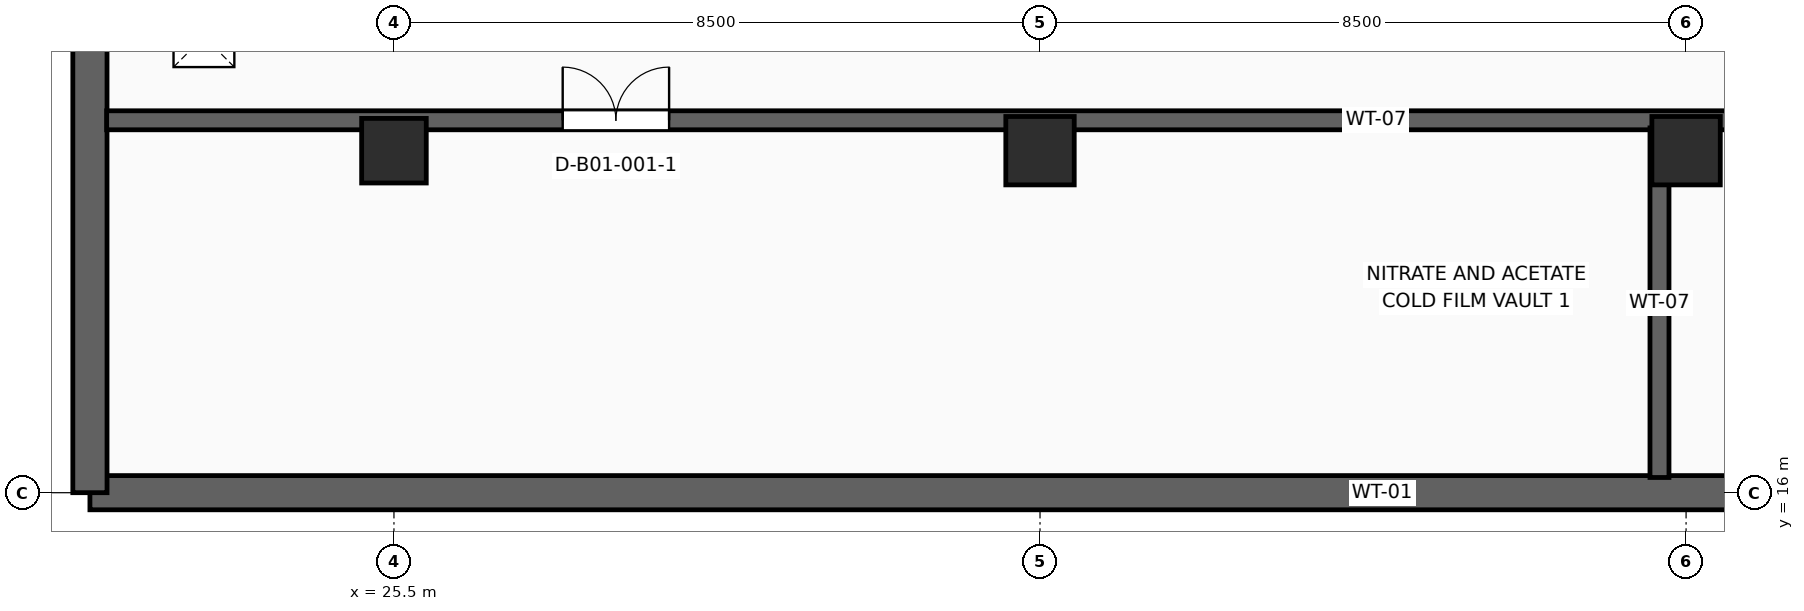
"""IFC4 building model, lengths in metres.
Left out: names, types, materials, properties, quantities, classifications, styles, units other than length and angle.
Written with IfcOpenShell. Run it as: python <this file> out.ifc"""

import sys

from ifc_helpers import new_model, si_unit, direction, frame, frame_2d, origin, origin_2d, place, context, subcontext, project, spatial, rectangle, extrude, element, fill, save


model = new_model("IFC4")
c1 = context("Model", 3, precision=1e-05, world=origin(), true_north=direction((0.0, 1.0)))
c2 = subcontext(c1, "Body", "Model", "MODEL_VIEW")
j1 = project(units=[si_unit("LENGTHUNIT", "METRE"), si_unit("PLANEANGLEUNIT", "RADIAN")], contexts=[c1])
p1 = place(None, origin())
s1 = spatial("IfcSite", under=j1, at=p1, CompositionType="ELEMENT")
p2 = place(p1, origin())
s2 = spatial("IfcBuilding", under=s1, at=p2, CompositionType="ELEMENT")
p3 = place(p2, frame((0.0, 0.0, -4.8)))
s3 = spatial("IfcBuildingStorey", under=s2, at=p3, CompositionType="ELEMENT", Elevation=-4.8)
p4 = place(p3, frame((21.5, 16.0, 0.0), z_axis=(0.0, 0.0, 1.0), x_axis=(1.0, 0.0, 0.0)))
e1 = element("IfcWall", 1, at=p4, inside=s3, PredefinedType="SHEAR", context=c2, shape_type="SweptSolid", body=[
    extrude(rectangle(XDim=55.0, YDim=0.45, at=frame_2d((27.5, 0.0))), origin(), (0.0, 0.0, 1.0), 4.42),
])
p5 = place(p3, frame((21.5, 16.0, 0.0), z_axis=(0.0, 0.0, 1.0), x_axis=(0.0, 1.0, 0.0)))
e2 = element("IfcWall", 2, at=p5, inside=s3, PredefinedType="SHEAR", context=c2, shape_type="SweptSolid", body=[
    extrude(rectangle(XDim=30.5, YDim=0.45, at=frame_2d((15.25, 0.0))), origin(), (0.0, 0.0, 1.0), 4.42),
])
p6 = place(p3, frame((25.5, 20.5, 0.0), z_axis=(0.0, 0.0, 1.0), x_axis=(1.0, 0.0, 0.0)))
e3 = element("IfcColumn", 3, at=p6, inside=s3, PredefinedType="COLUMN", context=c2, shape_type="SweptSolid", body=[
    extrude(rectangle(XDim=0.85, YDim=0.85, at=origin_2d()), origin(), (0.0, 0.0, 1.0), 4.46),
])
for number, where, z_axis, x_axis in (
    (4, (34.0, 20.5, 0.0), (0.0, 0.0, 1.0), (1.0, 0.0, 0.0)),
    (5, (42.5, 20.5, 0.0), (0.0, 0.0, 1.0), (1.0, 0.0, 0.0)),
):
    element("IfcColumn", number, at=place(p3, frame(where, z_axis=z_axis, x_axis=x_axis)), inside=s3, PredefinedType="COLUMN", context=c2, shape_type="SweptSolid", body=[
        extrude(rectangle(XDim=0.9, YDim=0.9, at=origin_2d()), origin(), (0.0, 0.0, 1.0), 4.46),
    ])
p7 = place(p3, frame((21.72, 20.9, 0.0), z_axis=(0.0, 0.0, 1.0), x_axis=(1.0, 0.0, 0.0)))
e6 = element("IfcWall", 6, at=p7, inside=s3, PredefinedType="STANDARD", context=c2, shape_type="SweptSolid", body=[
    extrude(rectangle(XDim=54.58, YDim=0.25, at=frame_2d((27.29, 0.0))), origin(), (0.0, 0.0, 1.0), 4.5),
])
p8 = place(p7, frame((6.0, 0.0, 0.0)))
e7 = element("IfcOpeningElement", 7, at=p8, cuts=e6, PredefinedType="OPENING", context=c2, shape_type="SweptSolid", body=[
    extrude(rectangle(XDim=1.4, YDim=2.3, at=frame_2d((0.7, 1.15))), frame((0.0, 0.137, 0.0), z_axis=(0.0, -1.0, 0.0), x_axis=(1.0, 0.0, 0.0)), (0.0, 0.0, 1.0), 0.274),
])
p9 = place(p7, frame((26.0, 0.0, 0.0)))
e8 = element("IfcOpeningElement", 8, at=p9, cuts=e6, PredefinedType="OPENING", context=c2, shape_type="SweptSolid", body=[
    extrude(rectangle(XDim=1.4, YDim=2.3, at=frame_2d((0.7, 1.15))), frame((0.0, 0.137, 0.0), z_axis=(0.0, -1.0, 0.0), x_axis=(1.0, 0.0, 0.0)), (0.0, 0.0, 1.0), 0.274),
])
p10 = place(p7, frame((42.2, 0.0, 0.0)))
e9 = element("IfcOpeningElement", 9, at=p10, cuts=e6, PredefinedType="OPENING", context=c2, shape_type="SweptSolid", body=[
    extrude(rectangle(XDim=1.4, YDim=2.3, at=frame_2d((0.7, 1.15))), frame((0.0, 0.137, 0.0), z_axis=(0.0, -1.0, 0.0), x_axis=(1.0, 0.0, 0.0)), (0.0, 0.0, 1.0), 0.274),
])
p11 = place(p3, frame((42.15, 16.2, 0.0), z_axis=(0.0, 0.0, 1.0), x_axis=(0.0, 1.0, 0.0)))
e10 = element("IfcWall", 10, at=p11, inside=s3, PredefinedType="STANDARD", context=c2, shape_type="SweptSolid", body=[
    extrude(rectangle(XDim=4.6, YDim=0.25, at=frame_2d((2.3, 0.0))), origin(), (0.0, 0.0, 1.0), 4.5),
])
p12 = place(p8, origin())
e11 = element("IfcDoor", 11, at=p12, inside=s3, OperationType="DOUBLE_DOOR_SINGLE_SWING", PredefinedType="DOOR", context=c2, shape_type="SweptSolid", body=[
    extrude(rectangle(XDim=1.4, YDim=2.3, at=frame_2d((0.7, 1.15))), frame((0.0, 0.025, 0.0), z_axis=(0.0, -1.0, 0.0), x_axis=(1.0, 0.0, 0.0)), (0.0, 0.0, 1.0), 0.05),
])
fill(e7, e11)
save(model, sys.argv[1])
